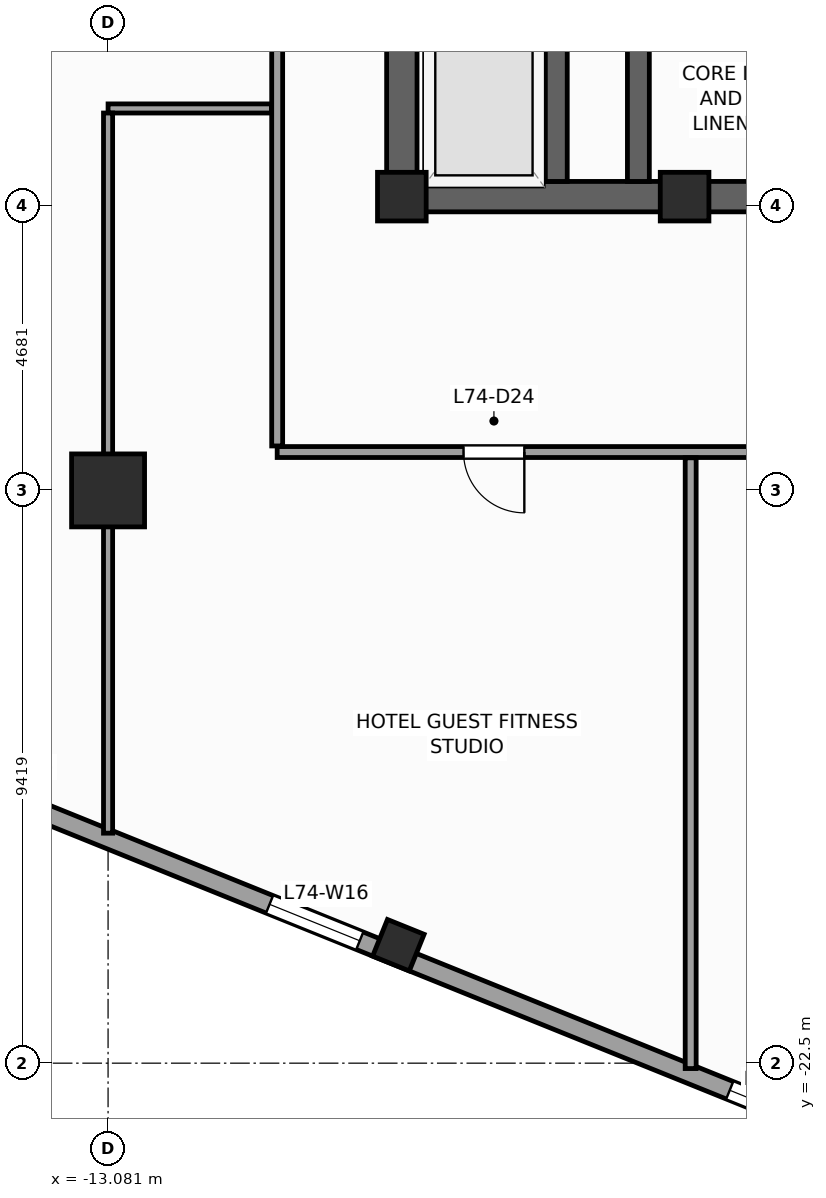
"""IFC4 building model, lengths in metres.
Left out: names, types, materials, properties, quantities, classifications, styles, units other than length and angle.
Written with IfcOpenShell. Run it as: python <this file> out.ifc"""

import sys

from ifc_helpers import new_model, si_unit, direction, frame, frame_2d, origin, origin_2d, place, context, subcontext, project, spatial, rectangle, extrude, source, transform, mapped, element, fill, save


model = new_model("IFC4")
c1 = context("Model", 3, precision=1e-05, world=origin(), true_north=direction((0.0, 1.0)))
c2 = subcontext(c1, "Body", "Model", "MODEL_VIEW")
j1 = project(units=[si_unit("LENGTHUNIT", "METRE"), si_unit("PLANEANGLEUNIT", "RADIAN")], contexts=[c1])
p1 = place(None, origin())
s1 = spatial("IfcSite", under=j1, at=p1, CompositionType="ELEMENT")
p2 = place(p1, origin())
s2 = spatial("IfcBuilding", under=s1, at=p2, CompositionType="ELEMENT")
p3 = place(p2, frame((0.0, 0.0, 301.2)))
s3 = spatial("IfcBuildingStorey", under=s2, at=p3, CompositionType="ELEMENT", Elevation=301.2)
p4 = place(p3, frame((-8.5, -8.25, 0.0), z_axis=(0.0, 0.0, 1.0), x_axis=(1.0, 0.0, 0.0)))
e1 = element("IfcWall", 1, at=p4, inside=s3, PredefinedType="SHEAR", context=c2, shape_type="SweptSolid", body=[
    extrude(rectangle(XDim=17.0, YDim=0.5, at=frame_2d((8.5, 0.0))), origin(), (0.0, 0.0, 1.0), 3.6),
])
p5 = place(p4, frame((7.85, 0.0, 0.0)))
e2 = element("IfcOpeningElement", 2, at=p5, cuts=e1, PredefinedType="OPENING", context=c2, shape_type="SweptSolid", body=[
    extrude(rectangle(XDim=1.3, YDim=2.2, at=frame_2d((0.65, 1.1))), frame((0.0, 0.26, 0.0), z_axis=(0.0, -1.0, 0.0), x_axis=(1.0, 0.0, 0.0)), (0.0, 0.0, 1.0), 0.52),
])
p6 = place(p3, frame((-8.25, -8.0, 0.0), z_axis=(0.0, 0.0, 1.0), x_axis=(0.0, 1.0, 0.0)))
e3 = element("IfcWall", 3, at=p6, inside=s3, PredefinedType="SHEAR", context=c2, shape_type="SweptSolid", body=[
    extrude(rectangle(XDim=16.0, YDim=0.5, at=frame_2d((8.0, 0.0))), origin(), (0.0, 0.0, 1.0), 3.6),
])
p7 = place(p6, frame((4.69, 0.0, 0.0)))
e4 = element("IfcOpeningElement", 4, at=p7, cuts=e3, PredefinedType="OPENING", context=c2, shape_type="SweptSolid", body=[
    extrude(rectangle(XDim=1.3, YDim=2.2, at=frame_2d((0.65, 1.1))), frame((0.0, 0.26, 0.0), z_axis=(0.0, -1.0, 0.0), x_axis=(1.0, 0.0, 0.0)), (0.0, 0.0, 1.0), 0.52),
])
p8 = place(p3, frame((-4.36, -8.0, 0.0), z_axis=(0.0, 0.0, 1.0), x_axis=(0.0, 1.0, 0.0)))
e5 = element("IfcWall", 5, at=p8, inside=s3, PredefinedType="SHEAR", context=c2, shape_type="SweptSolid", body=[
    extrude(rectangle(XDim=16.0, YDim=0.36, at=frame_2d((8.0, 0.0))), origin(), (0.0, 0.0, 1.0), 3.6),
])
p9 = place(p3, frame((-5.71, -8.0, 0.0), z_axis=(0.0, 0.0, 1.0), x_axis=(0.0, 1.0, 0.0)))
e6 = element("IfcWall", 6, at=p9, inside=s3, PredefinedType="SHEAR", context=c2, shape_type="SweptSolid", body=[
    extrude(rectangle(XDim=2.54, YDim=0.36, at=frame_2d((1.27, 0.0))), origin(), (0.0, 0.0, 1.0), 3.6),
])
m1 = source(origin(), c2, "Body", "SweptSolid", [
    extrude(rectangle(XDim=0.8, YDim=0.8, at=origin_2d()), origin(), (0.0, 0.0, 1.0), 3.6),
])
for number, where, z_axis, x_axis in (
    (7, (-8.25, -8.25, 0.0), (0.0, 0.0, 1.0), (1.0, 0.0, 0.0)),
    (8, (-3.6, -8.25, 0.0), (0.0, 0.0, 1.0), (1.0, 0.0, 0.0)),
):
    element("IfcColumn", number, at=place(p3, frame(where, z_axis=z_axis, x_axis=x_axis)), inside=s3, PredefinedType="PILASTER", context=c2, shape_type="MappedRepresentation", body=[
        mapped(m1, transform((0.0, 0.0, 0.0), scale=1.0)),
    ])
m2 = source(origin(), c2, "Body", "SweptSolid", [
    extrude(rectangle(XDim=1.2, YDim=1.2, at=origin_2d()), origin(), (0.0, 0.0, 1.0), 3.6),
])
p10 = place(p3, frame((-13.081, -13.081, 0.0), z_axis=(0.0, 0.0, 1.0), x_axis=(1.0, 0.0, 0.0)))
e9 = element("IfcColumn", 9, at=p10, inside=s3, PredefinedType="COLUMN", context=c2, shape_type="MappedRepresentation", body=[
    mapped(m2, transform((0.0, 0.0, 0.0), scale=1.0)),
])
m3 = source(origin(), c2, "Body", "SweptSolid", [
    extrude(rectangle(XDim=0.65, YDim=0.65, at=origin_2d()), origin(), (0.0, 0.0, 1.0), 3.6),
])
p11 = place(p3, frame((-8.307, -20.56, 0.0), z_axis=(0.0, 0.0, 1.0), x_axis=(0.374606593416, 0.927183854567, 0.0)))
e10 = element("IfcColumn", 10, at=p11, inside=s3, PredefinedType="COLUMN", context=c2, shape_type="MappedRepresentation", body=[
    mapped(m3, transform((0.0, 0.0, 0.0), scale=1.0)),
])
p12 = place(p3, frame((-23.813, -14.479, 0.0), z_axis=(0.0, 0.0, 1.0), x_axis=(0.927182657188, -0.374609557019, 0.0)))
e11 = element("IfcWall", 11, at=p12, inside=s3, PredefinedType="STANDARD", context=c2, shape_type="SweptSolid", body=[
    extrude(rectangle(XDim=33.31, YDim=0.31, at=frame_2d((16.655, 0.0))), origin(), (0.0, 0.0, 1.0), 2.75),
])
p13 = place(p12, frame((3.197, 0.0, 0.47)))
e12 = element("IfcOpeningElement", 12, at=p13, cuts=e11, PredefinedType="OPENING", context=c2, shape_type="SweptSolid", body=[
    extrude(rectangle(XDim=1.6, YDim=2.1, at=frame_2d((0.8, 1.05))), frame((0.0, 0.165, 0.0), z_axis=(0.0, -1.0, 0.0), x_axis=(1.0, 0.0, 0.0)), (0.0, 0.0, 1.0), 0.33),
])
p14 = place(p12, frame((8.86, 0.0, 0.47)))
e13 = element("IfcOpeningElement", 13, at=p14, cuts=e11, PredefinedType="OPENING", context=c2, shape_type="SweptSolid", body=[
    extrude(rectangle(XDim=1.6, YDim=2.1, at=frame_2d((0.8, 1.05))), frame((0.0, 0.165, 0.0), z_axis=(0.0, -1.0, 0.0), x_axis=(1.0, 0.0, 0.0)), (0.0, 0.0, 1.0), 0.33),
])
p15 = place(p12, frame((14.439, 0.0, 0.47)))
e14 = element("IfcOpeningElement", 14, at=p15, cuts=e11, PredefinedType="OPENING", context=c2, shape_type="SweptSolid", body=[
    extrude(rectangle(XDim=1.6, YDim=2.1, at=frame_2d((0.8, 1.05))), frame((0.0, 0.165, 0.0), z_axis=(0.0, -1.0, 0.0), x_axis=(1.0, 0.0, 0.0)), (0.0, 0.0, 1.0), 0.33),
])
p16 = place(p12, frame((22.601, 0.0, 0.47)))
e15 = element("IfcOpeningElement", 15, at=p16, cuts=e11, PredefinedType="OPENING", context=c2, shape_type="SweptSolid", body=[
    extrude(rectangle(XDim=1.6, YDim=2.1, at=frame_2d((0.8, 1.05))), frame((0.0, 0.165, 0.0), z_axis=(0.0, -1.0, 0.0), x_axis=(1.0, 0.0, 0.0)), (0.0, 0.0, 1.0), 0.33),
])
p17 = place(p12, frame((27.097, 0.0, 0.47)))
e16 = element("IfcOpeningElement", 16, at=p17, cuts=e11, PredefinedType="OPENING", context=c2, shape_type="SweptSolid", body=[
    extrude(rectangle(XDim=1.6, YDim=2.1, at=frame_2d((0.8, 1.05))), frame((0.0, 0.165, 0.0), z_axis=(0.0, -1.0, 0.0), x_axis=(1.0, 0.0, 0.0)), (0.0, 0.0, 1.0), 0.33),
])
p18 = place(p3, frame((-10.3, -12.45, 0.0), z_axis=(0.0, 0.0, 1.0), x_axis=(1.0, 0.0, 0.0)))
e17 = element("IfcWall", 17, at=p18, inside=s3, PredefinedType="PARTITIONING", context=c2, shape_type="SweptSolid", body=[
    extrude(rectangle(XDim=21.65, YDim=0.18, at=frame_2d((10.825, 0.0))), origin(), (0.0, 0.0, 1.0), 3.35),
])
p19 = place(p18, frame((14.786, 0.0, 0.0)))
e18 = element("IfcOpeningElement", 18, at=p19, cuts=e17, PredefinedType="OPENING", context=c2, shape_type="SweptSolid", body=[
    extrude(rectangle(XDim=0.95, YDim=2.1, at=frame_2d((0.475, 1.05))), frame((0.0, 0.1, 0.0), z_axis=(0.0, -1.0, 0.0), x_axis=(1.0, 0.0, 0.0)), (0.0, 0.0, 1.0), 0.2),
])
p20 = place(p18, frame((9.8, 0.0, 0.0)))
e19 = element("IfcOpeningElement", 19, at=p20, cuts=e17, PredefinedType="OPENING", context=c2, shape_type="SweptSolid", body=[
    extrude(rectangle(XDim=1.0, YDim=2.15, at=frame_2d((0.5, 1.075))), frame((0.0, 0.1, 0.0), z_axis=(0.0, -1.0, 0.0), x_axis=(1.0, 0.0, 0.0)), (0.0, 0.0, 1.0), 0.2),
])
p21 = place(p18, frame((3.064, 0.0, 0.0)))
e20 = element("IfcOpeningElement", 20, at=p21, cuts=e17, PredefinedType="OPENING", context=c2, shape_type="SweptSolid", body=[
    extrude(rectangle(XDim=1.0, YDim=2.15, at=frame_2d((0.5, 1.075))), frame((0.0, 0.1, 0.0), z_axis=(0.0, -1.0, 0.0), x_axis=(1.0, 0.0, 0.0)), (0.0, 0.0, 1.0), 0.2),
])
p22 = place(p3, frame((-10.3, -12.35, 0.0), z_axis=(0.0, 0.0, 1.0), x_axis=(0.0, 1.0, 0.0)))
e21 = element("IfcWall", 21, at=p22, inside=s3, PredefinedType="PARTITIONING", context=c2, shape_type="SweptSolid", body=[
    extrude(rectangle(XDim=22.55, YDim=0.18, at=frame_2d((11.275, 0.0))), origin(), (0.0, 0.0, 1.0), 3.35),
])
p23 = place(p22, frame((13.95, 0.0, 0.0)))
e22 = element("IfcOpeningElement", 22, at=p23, cuts=e21, PredefinedType="OPENING", context=c2, shape_type="SweptSolid", body=[
    extrude(rectangle(XDim=1.0, YDim=2.15, at=frame_2d((0.5, 1.075))), frame((0.0, 0.1, 0.0), z_axis=(0.0, -1.0, 0.0), x_axis=(1.0, 0.0, 0.0)), (0.0, 0.0, 1.0), 0.2),
])
p24 = place(p22, frame((17.25, 0.0, 0.0)))
e23 = element("IfcOpeningElement", 23, at=p24, cuts=e21, PredefinedType="OPENING", context=c2, shape_type="SweptSolid", body=[
    extrude(rectangle(XDim=1.0, YDim=2.15, at=frame_2d((0.5, 1.075))), frame((0.0, 0.1, 0.0), z_axis=(0.0, -1.0, 0.0), x_axis=(1.0, 0.0, 0.0)), (0.0, 0.0, 1.0), 0.2),
])
p25 = place(p22, frame((6.65, 0.0, 0.0)))
e24 = element("IfcOpeningElement", 24, at=p25, cuts=e21, PredefinedType="OPENING", context=c2, shape_type="SweptSolid", body=[
    extrude(rectangle(XDim=1.0, YDim=2.15, at=frame_2d((0.5, 1.075))), frame((0.0, 0.1, 0.0), z_axis=(0.0, -1.0, 0.0), x_axis=(1.0, 0.0, 0.0)), (0.0, 0.0, 1.0), 0.2),
])
p26 = place(p22, frame((10.15, 0.0, 0.0)))
e25 = element("IfcOpeningElement", 25, at=p26, cuts=e21, PredefinedType="OPENING", context=c2, shape_type="SweptSolid", body=[
    extrude(rectangle(XDim=1.0, YDim=2.15, at=frame_2d((0.5, 1.075))), frame((0.0, 0.1, 0.0), z_axis=(0.0, -1.0, 0.0), x_axis=(1.0, 0.0, 0.0)), (0.0, 0.0, 1.0), 0.2),
])
p27 = place(p3, frame((-3.5, -12.545, 0.0), z_axis=(0.0, 0.0, 1.0), x_axis=(0.0, -1.0, 0.0)))
e26 = element("IfcWall", 26, at=p27, inside=s3, PredefinedType="PARTITIONING", context=c2, shape_type="SweptSolid", body=[
    extrude(rectangle(XDim=10.044, YDim=0.18, at=frame_2d((5.022, 0.0))), origin(), (0.0, 0.0, 1.0), 3.35),
])
p28 = place(p3, frame((-10.395, -6.8, 0.0), z_axis=(0.0, 0.0, 1.0), x_axis=(-1.0, 0.0, 0.0)))
e27 = element("IfcWall", 27, at=p28, inside=s3, PredefinedType="PARTITIONING", context=c2, shape_type="SweptSolid", body=[
    extrude(rectangle(XDim=2.686, YDim=0.15, at=frame_2d((1.343, 0.0))), origin(), (0.0, 0.0, 1.0), 3.35),
])
p29 = place(p3, frame((-13.081, -6.875, 0.0), z_axis=(0.0, 0.0, 1.0), x_axis=(0.0, -1.0, 0.0)))
e28 = element("IfcWall", 28, at=p29, inside=s3, PredefinedType="PARTITIONING", context=c2, shape_type="SweptSolid", body=[
    extrude(rectangle(XDim=11.843, YDim=0.15, at=frame_2d((5.921, 0.0))), origin(), (0.0, 0.0, 1.0), 2.45),
])
m4 = source(origin(), c2, "Body", "SweptSolid", [
    extrude(rectangle(XDim=1.6, YDim=2.1, at=frame_2d((0.8, 1.05))), frame((0.0, 0.03, 0.0), z_axis=(0.0, -1.0, 0.0), x_axis=(1.0, 0.0, 0.0)), (0.0, 0.0, 1.0), 0.06),
])
p30 = place(p15, origin())
e29 = element("IfcWindow", 29, at=p30, inside=s3, PartitioningType="SINGLE_PANEL", PredefinedType="WINDOW", context=c2, shape_type="MappedRepresentation", body=[
    mapped(m4, transform((0.0, 0.0, 0.0), scale=1.0)),
])
fill(e14, e29)
p31 = place(p16, origin())
e30 = element("IfcWindow", 30, at=p31, inside=s3, PartitioningType="SINGLE_PANEL", PredefinedType="WINDOW", context=c2, shape_type="MappedRepresentation", body=[
    mapped(m4, transform((0.0, 0.0, 0.0), scale=1.0)),
])
fill(e15, e30)
m5 = source(origin(), c2, "Body", "SweptSolid", [
    extrude(rectangle(XDim=1.0, YDim=2.15, at=frame_2d((0.5, 1.075))), frame((0.0, 0.025, 0.0), z_axis=(0.0, -1.0, 0.0), x_axis=(1.0, 0.0, 0.0)), (0.0, 0.0, 1.0), 0.05),
])
p32 = place(p21, frame((1.0, 0.0, 0.0), z_axis=(0.0, 0.0, 1.0), x_axis=(-1.0, 0.0, 0.0)))
e31 = element("IfcDoor", 31, at=p32, inside=s3, OperationType="SINGLE_SWING_RIGHT", PredefinedType="DOOR", context=c2, shape_type="MappedRepresentation", body=[
    mapped(m5, transform((0.0, 0.0, 0.0), scale=1.0)),
])
fill(e20, e31)
save(model, sys.argv[1])
